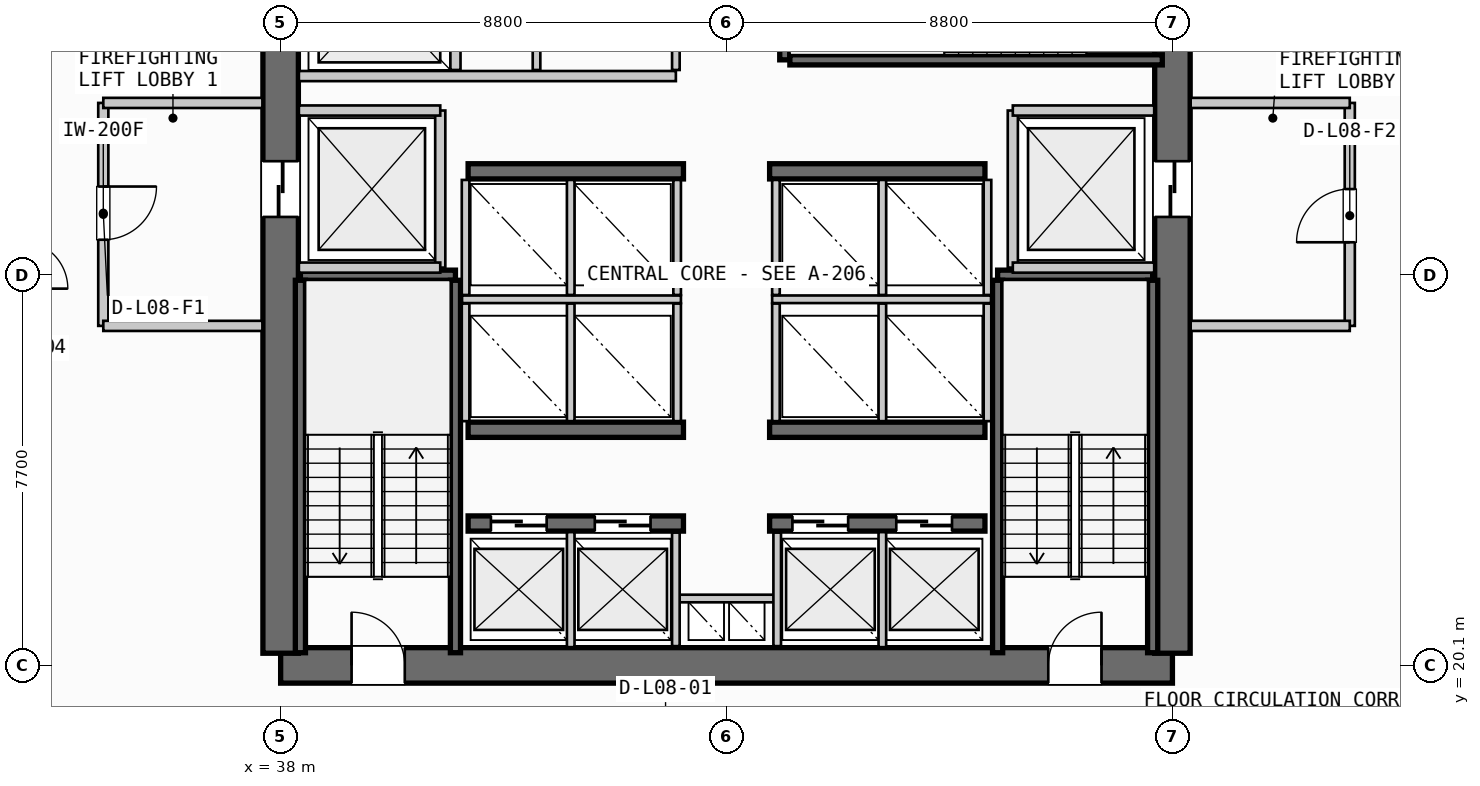
"""IFC4 building model, lengths in metres.
Left out: names, types, materials, properties, quantities, classifications, styles, units other than length and angle.
Written with IfcOpenShell. Run it as: python <this file> out.ifc"""

import sys

from ifc_helpers import new_model, si_unit, direction, frame, frame_2d, origin, place, context, subcontext, project, spatial, rectangle, extrude, source, transform, mapped, element, fill, save


model = new_model("IFC4")
c1 = context("Model", 3, precision=1e-05, world=origin(), true_north=direction((0.0, 1.0)))
c2 = subcontext(c1, "Body", "Model", "MODEL_VIEW")
j1 = project(units=[si_unit("LENGTHUNIT", "METRE"), si_unit("PLANEANGLEUNIT", "RADIAN")], contexts=[c1])
p1 = place(None, origin())
s1 = spatial("IfcSite", under=j1, at=p1, CompositionType="ELEMENT")
p2 = place(p1, origin())
s2 = spatial("IfcBuilding", under=s1, at=p2, CompositionType="ELEMENT")
p3 = place(p2, frame((0.0, 0.0, 37.2)))
s3 = spatial("IfcBuildingStorey", under=s2, at=p3, CompositionType="ELEMENT", Elevation=37.2)
p4 = place(p3, frame((38.0, 20.1, 0.0), z_axis=(0.0, 0.0, 1.0), x_axis=(1.0, 0.0, 0.0)))
e1 = element("IfcWall", 1, at=p4, inside=s3, PredefinedType="SHEAR", context=c2, shape_type="SweptSolid", body=[
    extrude(rectangle(XDim=17.6, YDim=0.7, at=frame_2d((8.8, 0.0))), origin(), (0.0, 0.0, 1.0), 3.55),
])
p5 = place(p4, frame((1.4, 0.0, 0.0)))
e2 = element("IfcOpeningElement", 2, at=p5, cuts=e1, PredefinedType="OPENING", context=c2, shape_type="SweptSolid", body=[
    extrude(rectangle(XDim=1.05, YDim=2.15, at=frame_2d((0.525, 1.075))), frame((0.0, 0.36, 0.0), z_axis=(0.0, -1.0, 0.0), x_axis=(1.0, 0.0, 0.0)), (0.0, 0.0, 1.0), 0.72),
])
p6 = place(p4, frame((15.15, 0.0, 0.0)))
e3 = element("IfcOpeningElement", 3, at=p6, cuts=e1, PredefinedType="OPENING", context=c2, shape_type="SweptSolid", body=[
    extrude(rectangle(XDim=1.05, YDim=2.15, at=frame_2d((0.525, 1.075))), frame((0.0, 0.36, 0.0), z_axis=(0.0, -1.0, 0.0), x_axis=(1.0, 0.0, 0.0)), (0.0, 0.0, 1.0), 0.72),
])
p7 = place(p3, frame((38.0, 35.26, 0.0), z_axis=(0.0, 0.0, 1.0), x_axis=(0.0, -1.0, 0.0)))
e4 = element("IfcWall", 4, at=p7, inside=s3, PredefinedType="SHEAR", context=c2, shape_type="SweptSolid", body=[
    extrude(rectangle(XDim=14.92, YDim=0.7, at=frame_2d((7.46, 0.0))), origin(), (0.0, 0.0, 1.0), 3.55),
])
p8 = place(p7, frame((5.21, 0.0, 0.0)))
e5 = element("IfcOpeningElement", 5, at=p8, cuts=e4, PredefinedType="OPENING", context=c2, shape_type="SweptSolid", body=[
    extrude(rectangle(XDim=1.1, YDim=2.2, at=frame_2d((0.55, 1.1))), frame((0.0, 0.36, 0.0), z_axis=(0.0, -1.0, 0.0), x_axis=(1.0, 0.0, 0.0)), (0.0, 0.0, 1.0), 0.72),
])
p9 = place(p3, frame((55.6, 20.34, 0.0), z_axis=(0.0, 0.0, 1.0), x_axis=(0.0, 1.0, 0.0)))
e6 = element("IfcWall", 6, at=p9, inside=s3, PredefinedType="SHEAR", context=c2, shape_type="SweptSolid", body=[
    extrude(rectangle(XDim=14.92, YDim=0.7, at=frame_2d((7.46, 0.0))), origin(), (0.0, 0.0, 1.0), 3.55),
])
p10 = place(p9, frame((12.71, 0.0, 0.0)))
e7 = element("IfcOpeningElement", 7, at=p10, cuts=e6, PredefinedType="OPENING", context=c2, shape_type="SweptSolid", body=[
    extrude(rectangle(XDim=1.05, YDim=2.15, at=frame_2d((0.525, 1.075))), frame((0.0, 0.36, 0.0), z_axis=(0.0, -1.0, 0.0), x_axis=(1.0, 0.0, 0.0)), (0.0, 0.0, 1.0), 0.72),
])
p11 = place(p9, frame((8.61, 0.0, 0.0)))
e8 = element("IfcOpeningElement", 8, at=p11, cuts=e6, PredefinedType="OPENING", context=c2, shape_type="SweptSolid", body=[
    extrude(rectangle(XDim=1.1, YDim=2.2, at=frame_2d((0.55, 1.1))), frame((0.0, 0.36, 0.0), z_axis=(0.0, -1.0, 0.0), x_axis=(1.0, 0.0, 0.0)), (0.0, 0.0, 1.0), 0.72),
])
p12 = place(p3, frame((41.7, 22.9, 0.0), z_axis=(0.0, 0.0, 1.0), x_axis=(1.0, 0.0, 0.0)))
e9 = element("IfcWall", 9, at=p12, inside=s3, PredefinedType="SHEAR", context=c2, shape_type="SweptSolid", body=[
    extrude(rectangle(XDim=4.25, YDim=0.3, at=frame_2d((2.125, 0.0))), origin(), (0.0, 0.0, 1.0), 3.55),
])
p13 = place(p12, frame((0.45, 0.0, 0.0)))
e10 = element("IfcOpeningElement", 10, at=p13, cuts=e9, PredefinedType="OPENING", context=c2, shape_type="SweptSolid", body=[
    extrude(rectangle(XDim=1.1, YDim=2.2, at=frame_2d((0.55, 1.1))), frame((0.0, 0.16, 0.0), z_axis=(0.0, -1.0, 0.0), x_axis=(1.0, 0.0, 0.0)), (0.0, 0.0, 1.0), 0.32),
])
p14 = place(p12, frame((2.5, 0.0, 0.0)))
e11 = element("IfcOpeningElement", 11, at=p14, cuts=e9, PredefinedType="OPENING", context=c2, shape_type="SweptSolid", body=[
    extrude(rectangle(XDim=1.1, YDim=2.2, at=frame_2d((0.55, 1.1))), frame((0.0, 0.16, 0.0), z_axis=(0.0, -1.0, 0.0), x_axis=(1.0, 0.0, 0.0)), (0.0, 0.0, 1.0), 0.32),
])
p15 = place(p3, frame((47.65, 22.9, 0.0), z_axis=(0.0, 0.0, 1.0), x_axis=(1.0, 0.0, 0.0)))
e12 = element("IfcWall", 12, at=p15, inside=s3, PredefinedType="SHEAR", context=c2, shape_type="SweptSolid", body=[
    extrude(rectangle(XDim=4.25, YDim=0.3, at=frame_2d((2.125, 0.0))), origin(), (0.0, 0.0, 1.0), 3.55),
])
p16 = place(p15, frame((0.45, 0.0, 0.0)))
e13 = element("IfcOpeningElement", 13, at=p16, cuts=e12, PredefinedType="OPENING", context=c2, shape_type="SweptSolid", body=[
    extrude(rectangle(XDim=1.1, YDim=2.2, at=frame_2d((0.55, 1.1))), frame((0.0, 0.16, 0.0), z_axis=(0.0, -1.0, 0.0), x_axis=(1.0, 0.0, 0.0)), (0.0, 0.0, 1.0), 0.32),
])
p17 = place(p15, frame((2.5, 0.0, 0.0)))
e14 = element("IfcOpeningElement", 14, at=p17, cuts=e12, PredefinedType="OPENING", context=c2, shape_type="SweptSolid", body=[
    extrude(rectangle(XDim=1.1, YDim=2.2, at=frame_2d((0.55, 1.1))), frame((0.0, 0.16, 0.0), z_axis=(0.0, -1.0, 0.0), x_axis=(1.0, 0.0, 0.0)), (0.0, 0.0, 1.0), 0.32),
])
for number, where, z_axis, x_axis in (
    (15, (41.7, 24.75, 0.0), (0.0, 0.0, 1.0), (1.0, 0.0, 0.0)),
    (16, (47.65, 24.75, 0.0), (0.0, 0.0, 1.0), (1.0, 0.0, 0.0)),
    (17, (41.7, 29.85, 0.0), (0.0, 0.0, 1.0), (1.0, 0.0, 0.0)),
    (18, (47.65, 29.85, 0.0), (0.0, 0.0, 1.0), (1.0, 0.0, 0.0)),
):
    element("IfcWall", number, at=place(p3, frame(where, z_axis=z_axis, x_axis=x_axis)), inside=s3, PredefinedType="SHEAR", context=c2, shape_type="SweptSolid", body=[
        extrude(rectangle(XDim=4.25, YDim=0.3, at=frame_2d((2.125, 0.0))), origin(), (0.0, 0.0, 1.0), 3.55),
    ])
p18 = place(p3, frame((38.39, 27.8, 0.0), z_axis=(0.0, 0.0, 1.0), x_axis=(1.0, 0.0, 0.0)))
e19 = element("IfcWall", 19, at=p18, inside=s3, PredefinedType="SHEAR", context=c2, shape_type="SweptSolid", body=[
    extrude(rectangle(XDim=3.06, YDim=0.2, at=frame_2d((1.53, 0.0))), origin(), (0.0, 0.0, 1.0), 3.55),
])
for number, where, z_axis, x_axis in (
    (20, (41.45, 27.7, 0.0), (0.0, 0.0, 1.0), (0.0, -1.0, 0.0)),
    (21, (38.39, 20.35, 0.0), (0.0, 0.0, 1.0), (0.0, 1.0, 0.0)),
):
    element("IfcWall", number, at=place(p3, frame(where, z_axis=z_axis, x_axis=x_axis)), inside=s3, PredefinedType="SHEAR", context=c2, shape_type="SweptSolid", body=[
        extrude(rectangle(XDim=7.35, YDim=0.2, at=frame_2d((3.675, 0.0))), origin(), (0.0, 0.0, 1.0), 3.55),
    ])
p19 = place(p3, frame((52.15, 27.8, 0.0), z_axis=(0.0, 0.0, 1.0), x_axis=(1.0, 0.0, 0.0)))
e22 = element("IfcWall", 22, at=p19, inside=s3, PredefinedType="SHEAR", context=c2, shape_type="SweptSolid", body=[
    extrude(rectangle(XDim=3.06, YDim=0.2, at=frame_2d((1.53, 0.0))), origin(), (0.0, 0.0, 1.0), 3.55),
])
for number, where, z_axis, x_axis in (
    (23, (55.21, 27.7, 0.0), (0.0, 0.0, 1.0), (0.0, -1.0, 0.0)),
    (24, (52.15, 20.35, 0.0), (0.0, 0.0, 1.0), (0.0, 1.0, 0.0)),
):
    element("IfcWall", number, at=place(p3, frame(where, z_axis=z_axis, x_axis=x_axis)), inside=s3, PredefinedType="SHEAR", context=c2, shape_type="SweptSolid", body=[
        extrude(rectangle(XDim=7.35, YDim=0.2, at=frame_2d((3.675, 0.0))), origin(), (0.0, 0.0, 1.0), 3.55),
    ])
p20 = place(p3, frame((47.95, 32.05, 0.0), z_axis=(0.0, 0.0, 1.0), x_axis=(0.0, 1.0, 0.0)))
e25 = element("IfcWall", 25, at=p20, inside=s3, PredefinedType="SHEAR", context=c2, shape_type="SweptSolid", body=[
    extrude(rectangle(XDim=3.06, YDim=0.2, at=frame_2d((1.53, 0.0))), origin(), (0.0, 0.0, 1.0), 3.55),
])
p21 = place(p3, frame((55.4, 32.05, 0.0), z_axis=(0.0, 0.0, 1.0), x_axis=(-1.0, 0.0, 0.0)))
e26 = element("IfcWall", 26, at=p21, inside=s3, PredefinedType="SHEAR", context=c2, shape_type="SweptSolid", body=[
    extrude(rectangle(XDim=7.35, YDim=0.2, at=frame_2d((3.675, 0.0))), origin(), (0.0, 0.0, 1.0), 3.55),
])
p22 = place(p3, frame((45.8, 21.42, 0.0), z_axis=(0.0, 0.0, 1.0), x_axis=(1.0, 0.0, 0.0)))
e27 = element("IfcWall", 27, at=p22, inside=s3, PredefinedType="PARTITIONING", context=c2, shape_type="SweptSolid", body=[
    extrude(rectangle(XDim=2.0, YDim=0.15, at=frame_2d((1.0, 0.0))), origin(), (0.0, 0.0, 1.0), 2.925),
])
for number, where, z_axis, x_axis in (
    (28, (45.8, 20.48, 0.0), (0.0, 0.0, 1.0), (0.0, 1.0, 0.0)),
    (29, (47.8, 20.48, 0.0), (0.0, 0.0, 1.0), (0.0, 1.0, 0.0)),
):
    element("IfcWall", number, at=place(p3, frame(where, z_axis=z_axis, x_axis=x_axis)), inside=s3, PredefinedType="PARTITIONING", context=c2, shape_type="SweptSolid", body=[
        extrude(rectangle(XDim=2.24, YDim=0.15, at=frame_2d((1.12, 0.0))), origin(), (0.0, 0.0, 1.0), 2.925),
    ])
p23 = place(p3, frame((41.15, 27.95, 0.0), z_axis=(0.0, 0.0, 1.0), x_axis=(0.0, 1.0, 0.0)))
e30 = element("IfcWall", 30, at=p23, inside=s3, PredefinedType="PARTITIONING", context=c2, shape_type="SweptSolid", body=[
    extrude(rectangle(XDim=3.1, YDim=0.2, at=frame_2d((1.55, 0.0))), origin(), (0.0, 0.0, 1.0), 2.925),
])
for number, where, z_axis, x_axis in (
    (31, (38.36, 27.95, 0.0), (0.0, 0.0, 1.0), (1.0, 0.0, 0.0)),
    (32, (38.36, 31.05, 0.0), (0.0, 0.0, 1.0), (1.0, 0.0, 0.0)),
):
    element("IfcWall", number, at=place(p3, frame(where, z_axis=z_axis, x_axis=x_axis)), inside=s3, PredefinedType="PARTITIONING", context=c2, shape_type="SweptSolid", body=[
        extrude(rectangle(XDim=2.79, YDim=0.2, at=frame_2d((1.395, 0.0))), origin(), (0.0, 0.0, 1.0), 2.925),
    ])
p24 = place(p3, frame((34.5, 31.2, 0.0), z_axis=(0.0, 0.0, 1.0), x_axis=(0.0, -1.0, 0.0)))
e33 = element("IfcWall", 33, at=p24, inside=s3, PredefinedType="PARTITIONING", context=c2, shape_type="SweptSolid", body=[
    extrude(rectangle(XDim=4.4, YDim=0.2, at=frame_2d((2.2, 0.0))), origin(), (0.0, 0.0, 1.0), 2.925),
])
p25 = place(p24, frame((1.65, 0.0, 0.0)))
e34 = element("IfcOpeningElement", 34, at=p25, cuts=e33, PredefinedType="OPENING", context=c2, shape_type="SweptSolid", body=[
    extrude(rectangle(XDim=1.05, YDim=2.15, at=frame_2d((0.525, 1.075))), frame((0.0, 0.11, 0.0), z_axis=(0.0, -1.0, 0.0), x_axis=(1.0, 0.0, 0.0)), (0.0, 0.0, 1.0), 0.22),
])
for number, where, z_axis, x_axis in (
    (35, (34.5, 26.8, 0.0), (0.0, 0.0, 1.0), (1.0, 0.0, 0.0)),
    (36, (34.5, 31.2, 0.0), (0.0, 0.0, 1.0), (1.0, 0.0, 0.0)),
):
    element("IfcWall", number, at=place(p3, frame(where, z_axis=z_axis, x_axis=x_axis)), inside=s3, PredefinedType="PARTITIONING", context=c2, shape_type="SweptSolid", body=[
        extrude(rectangle(XDim=3.14, YDim=0.2, at=frame_2d((1.57, 0.0))), origin(), (0.0, 0.0, 1.0), 2.925),
    ])
p26 = place(p3, frame((52.45, 27.95, 0.0), z_axis=(0.0, 0.0, 1.0), x_axis=(0.0, 1.0, 0.0)))
e37 = element("IfcWall", 37, at=p26, inside=s3, PredefinedType="PARTITIONING", context=c2, shape_type="SweptSolid", body=[
    extrude(rectangle(XDim=3.1, YDim=0.2, at=frame_2d((1.55, 0.0))), origin(), (0.0, 0.0, 1.0), 2.925),
])
for number, where, z_axis, x_axis in (
    (38, (52.45, 27.95, 0.0), (0.0, 0.0, 1.0), (1.0, 0.0, 0.0)),
    (39, (52.45, 31.05, 0.0), (0.0, 0.0, 1.0), (1.0, 0.0, 0.0)),
):
    element("IfcWall", number, at=place(p3, frame(where, z_axis=z_axis, x_axis=x_axis)), inside=s3, PredefinedType="PARTITIONING", context=c2, shape_type="SweptSolid", body=[
        extrude(rectangle(XDim=2.79, YDim=0.2, at=frame_2d((1.395, 0.0))), origin(), (0.0, 0.0, 1.0), 2.925),
    ])
p27 = place(p3, frame((59.1, 26.8, 0.0), z_axis=(0.0, 0.0, 1.0), x_axis=(0.0, 1.0, 0.0)))
e40 = element("IfcWall", 40, at=p27, inside=s3, PredefinedType="PARTITIONING", context=c2, shape_type="SweptSolid", body=[
    extrude(rectangle(XDim=4.4, YDim=0.2, at=frame_2d((2.2, 0.0))), origin(), (0.0, 0.0, 1.0), 2.925),
])
p28 = place(p27, frame((1.65, 0.0, 0.0)))
e41 = element("IfcOpeningElement", 41, at=p28, cuts=e40, PredefinedType="OPENING", context=c2, shape_type="SweptSolid", body=[
    extrude(rectangle(XDim=1.05, YDim=2.15, at=frame_2d((0.525, 1.075))), frame((0.0, 0.11, 0.0), z_axis=(0.0, -1.0, 0.0), x_axis=(1.0, 0.0, 0.0)), (0.0, 0.0, 1.0), 0.22),
])
for number, where, z_axis, x_axis in (
    (42, (55.96, 26.8, 0.0), (0.0, 0.0, 1.0), (1.0, 0.0, 0.0)),
    (43, (55.96, 31.2, 0.0), (0.0, 0.0, 1.0), (1.0, 0.0, 0.0)),
):
    element("IfcWall", number, at=place(p3, frame(where, z_axis=z_axis, x_axis=x_axis)), inside=s3, PredefinedType="PARTITIONING", context=c2, shape_type="SweptSolid", body=[
        extrude(rectangle(XDim=3.14, YDim=0.2, at=frame_2d((1.57, 0.0))), origin(), (0.0, 0.0, 1.0), 2.925),
    ])
for number, where, z_axis, x_axis in (
    (44, (43.725, 20.46, 0.0), (0.0, 0.0, 1.0), (0.0, 1.0, 0.0)),
    (45, (49.875, 20.46, 0.0), (0.0, 0.0, 1.0), (0.0, 1.0, 0.0)),
):
    element("IfcWall", number, at=place(p3, frame(where, z_axis=z_axis, x_axis=x_axis)), inside=s3, PredefinedType="PARTITIONING", context=c2, shape_type="SweptSolid", body=[
        extrude(rectangle(XDim=2.27, YDim=0.15, at=frame_2d((1.135, 0.0))), origin(), (0.0, 0.0, 1.0), 2.925),
    ])
p29 = place(p3, frame((41.58, 27.325, 0.0), z_axis=(0.0, 0.0, 1.0), x_axis=(1.0, 0.0, 0.0)))
e46 = element("IfcWall", 46, at=p29, inside=s3, PredefinedType="PARTITIONING", context=c2, shape_type="SweptSolid", body=[
    extrude(rectangle(XDim=4.32, YDim=0.15, at=frame_2d((2.16, 0.0))), origin(), (0.0, 0.0, 1.0), 2.925),
])
p30 = place(p3, frame((47.7, 27.325, 0.0), z_axis=(0.0, 0.0, 1.0), x_axis=(1.0, 0.0, 0.0)))
e47 = element("IfcWall", 47, at=p30, inside=s3, PredefinedType="PARTITIONING", context=c2, shape_type="SweptSolid", body=[
    extrude(rectangle(XDim=4.32, YDim=0.15, at=frame_2d((2.16, 0.0))), origin(), (0.0, 0.0, 1.0), 2.925),
])
for number, where, z_axis, x_axis in (
    (48, (41.65, 24.92, 0.0), (0.0, 0.0, 1.0), (0.0, 1.0, 0.0)),
    (49, (43.725, 24.92, 0.0), (0.0, 0.0, 1.0), (0.0, 1.0, 0.0)),
    (50, (45.825, 24.92, 0.0), (0.0, 0.0, 1.0), (0.0, 1.0, 0.0)),
    (51, (47.775, 24.92, 0.0), (0.0, 0.0, 1.0), (0.0, 1.0, 0.0)),
    (52, (49.875, 24.92, 0.0), (0.0, 0.0, 1.0), (0.0, 1.0, 0.0)),
    (53, (51.95, 24.92, 0.0), (0.0, 0.0, 1.0), (0.0, 1.0, 0.0)),
):
    element("IfcWall", number, at=place(p3, frame(where, z_axis=z_axis, x_axis=x_axis)), inside=s3, PredefinedType="PARTITIONING", context=c2, shape_type="SweptSolid", body=[
        extrude(rectangle(XDim=2.32, YDim=0.15, at=frame_2d((1.16, 0.0))), origin(), (0.0, 0.0, 1.0), 2.925),
    ])
for number, where, z_axis, x_axis in (
    (54, (41.65, 27.41, 0.0), (0.0, 0.0, 1.0), (0.0, 1.0, 0.0)),
    (55, (43.725, 27.41, 0.0), (0.0, 0.0, 1.0), (0.0, 1.0, 0.0)),
    (56, (45.825, 27.41, 0.0), (0.0, 0.0, 1.0), (0.0, 1.0, 0.0)),
    (57, (47.775, 27.41, 0.0), (0.0, 0.0, 1.0), (0.0, 1.0, 0.0)),
    (58, (49.875, 27.41, 0.0), (0.0, 0.0, 1.0), (0.0, 1.0, 0.0)),
    (59, (51.95, 27.41, 0.0), (0.0, 0.0, 1.0), (0.0, 1.0, 0.0)),
):
    element("IfcWall", number, at=place(p3, frame(where, z_axis=z_axis, x_axis=x_axis)), inside=s3, PredefinedType="PARTITIONING", context=c2, shape_type="SweptSolid", body=[
        extrude(rectangle(XDim=2.27, YDim=0.15, at=frame_2d((1.135, 0.0))), origin(), (0.0, 0.0, 1.0), 2.925),
    ])
p31 = place(p3, frame((41.45, 31.85, 0.0), z_axis=(0.0, 0.0, 1.0), x_axis=(0.0, 1.0, 0.0)))
e60 = element("IfcWall", 60, at=p31, inside=s3, PredefinedType="PARTITIONING", context=c2, shape_type="SweptSolid", body=[
    extrude(rectangle(XDim=3.29, YDim=0.2, at=frame_2d((1.645, 0.0))), origin(), (0.0, 0.0, 1.0), 2.925),
])
p32 = place(p3, frame((38.36, 31.73, 0.0), z_axis=(0.0, 0.0, 1.0), x_axis=(1.0, 0.0, 0.0)))
e61 = element("IfcWall", 61, at=p32, inside=s3, PredefinedType="PARTITIONING", context=c2, shape_type="SweptSolid", body=[
    extrude(rectangle(XDim=7.44, YDim=0.2, at=frame_2d((3.72, 0.0))), origin(), (0.0, 0.0, 1.0), 2.925),
])
p33 = place(p3, frame((45.8, 31.85, 0.0), z_axis=(0.0, 0.0, 1.0), x_axis=(0.0, 1.0, 0.0)))
e62 = element("IfcWall", 62, at=p33, inside=s3, PredefinedType="PARTITIONING", context=c2, shape_type="SweptSolid", body=[
    extrude(rectangle(XDim=3.29, YDim=0.15, at=frame_2d((1.645, 0.0))), origin(), (0.0, 0.0, 1.0), 2.925),
])
p34 = place(p3, frame((43.05, 31.85, 0.0), z_axis=(0.0, 0.0, 1.0), x_axis=(0.0, 1.0, 0.0)))
e63 = element("IfcWall", 63, at=p34, inside=s3, PredefinedType="PLUMBINGWALL", context=c2, shape_type="SweptSolid", body=[
    extrude(rectangle(XDim=3.29, YDim=0.15, at=frame_2d((1.645, 0.0))), origin(), (0.0, 0.0, 1.0), 2.925),
])
m1 = source(origin(), c2, "Body", "SweptSolid", [
    extrude(rectangle(XDim=1.05, YDim=2.15, at=frame_2d((0.525, 1.075))), frame((0.0, 0.025, 0.0), z_axis=(0.0, -1.0, 0.0), x_axis=(1.0, 0.0, 0.0)), (0.0, 0.0, 1.0), 0.05),
])
p35 = place(p5, origin())
e64 = element("IfcDoor", 64, at=p35, inside=s3, OperationType="SINGLE_SWING_LEFT", PredefinedType="DOOR", context=c2, shape_type="MappedRepresentation", body=[
    mapped(m1, transform((0.0, 0.0, 0.0), scale=1.0)),
])
fill(e2, e64)
p36 = place(p6, origin())
e65 = element("IfcDoor", 65, at=p36, inside=s3, OperationType="SINGLE_SWING_RIGHT", PredefinedType="DOOR", context=c2, shape_type="MappedRepresentation", body=[
    mapped(m1, transform((0.0, 0.0, 0.0), scale=1.0)),
])
fill(e3, e65)
m2 = source(origin(), c2, "Body", "SweptSolid", [
    extrude(rectangle(XDim=1.1, YDim=2.2, at=frame_2d((0.55, 1.1))), frame((0.0, 0.025, 0.0), z_axis=(0.0, -1.0, 0.0), x_axis=(1.0, 0.0, 0.0)), (0.0, 0.0, 1.0), 0.05),
])
p37 = place(p8, origin())
e66 = element("IfcDoor", 66, at=p37, inside=s3, OperationType="SLIDING_TO_LEFT", PredefinedType="DOOR", context=c2, shape_type="MappedRepresentation", body=[
    mapped(m2, transform((0.0, 0.0, 0.0), scale=1.0)),
])
fill(e5, e66)
p38 = place(p11, origin())
e67 = element("IfcDoor", 67, at=p38, inside=s3, OperationType="SLIDING_TO_RIGHT", PredefinedType="DOOR", context=c2, shape_type="MappedRepresentation", body=[
    mapped(m2, transform((0.0, 0.0, 0.0), scale=1.0)),
])
fill(e8, e67)
p39 = place(p13, origin())
e68 = element("IfcDoor", 68, at=p39, inside=s3, OperationType="SLIDING_TO_LEFT", PredefinedType="DOOR", context=c2, shape_type="MappedRepresentation", body=[
    mapped(m2, transform((0.0, 0.0, 0.0), scale=1.0)),
])
fill(e10, e68)
p40 = place(p14, origin())
e69 = element("IfcDoor", 69, at=p40, inside=s3, OperationType="SLIDING_TO_LEFT", PredefinedType="DOOR", context=c2, shape_type="MappedRepresentation", body=[
    mapped(m2, transform((0.0, 0.0, 0.0), scale=1.0)),
])
fill(e11, e69)
p41 = place(p16, origin())
e70 = element("IfcDoor", 70, at=p41, inside=s3, OperationType="SLIDING_TO_LEFT", PredefinedType="DOOR", context=c2, shape_type="MappedRepresentation", body=[
    mapped(m2, transform((0.0, 0.0, 0.0), scale=1.0)),
])
fill(e13, e70)
p42 = place(p17, origin())
e71 = element("IfcDoor", 71, at=p42, inside=s3, OperationType="SLIDING_TO_LEFT", PredefinedType="DOOR", context=c2, shape_type="MappedRepresentation", body=[
    mapped(m2, transform((0.0, 0.0, 0.0), scale=1.0)),
])
fill(e14, e71)
p43 = place(p25, origin())
e72 = element("IfcDoor", 72, at=p43, inside=s3, OperationType="SINGLE_SWING_LEFT", PredefinedType="DOOR", context=c2, shape_type="MappedRepresentation", body=[
    mapped(m1, transform((0.0, 0.0, 0.0), scale=1.0)),
])
fill(e34, e72)
p44 = place(p28, origin())
e73 = element("IfcDoor", 73, at=p44, inside=s3, OperationType="SINGLE_SWING_LEFT", PredefinedType="DOOR", context=c2, shape_type="MappedRepresentation", body=[
    mapped(m1, transform((0.0, 0.0, 0.0), scale=1.0)),
])
fill(e41, e73)
save(model, sys.argv[1])
